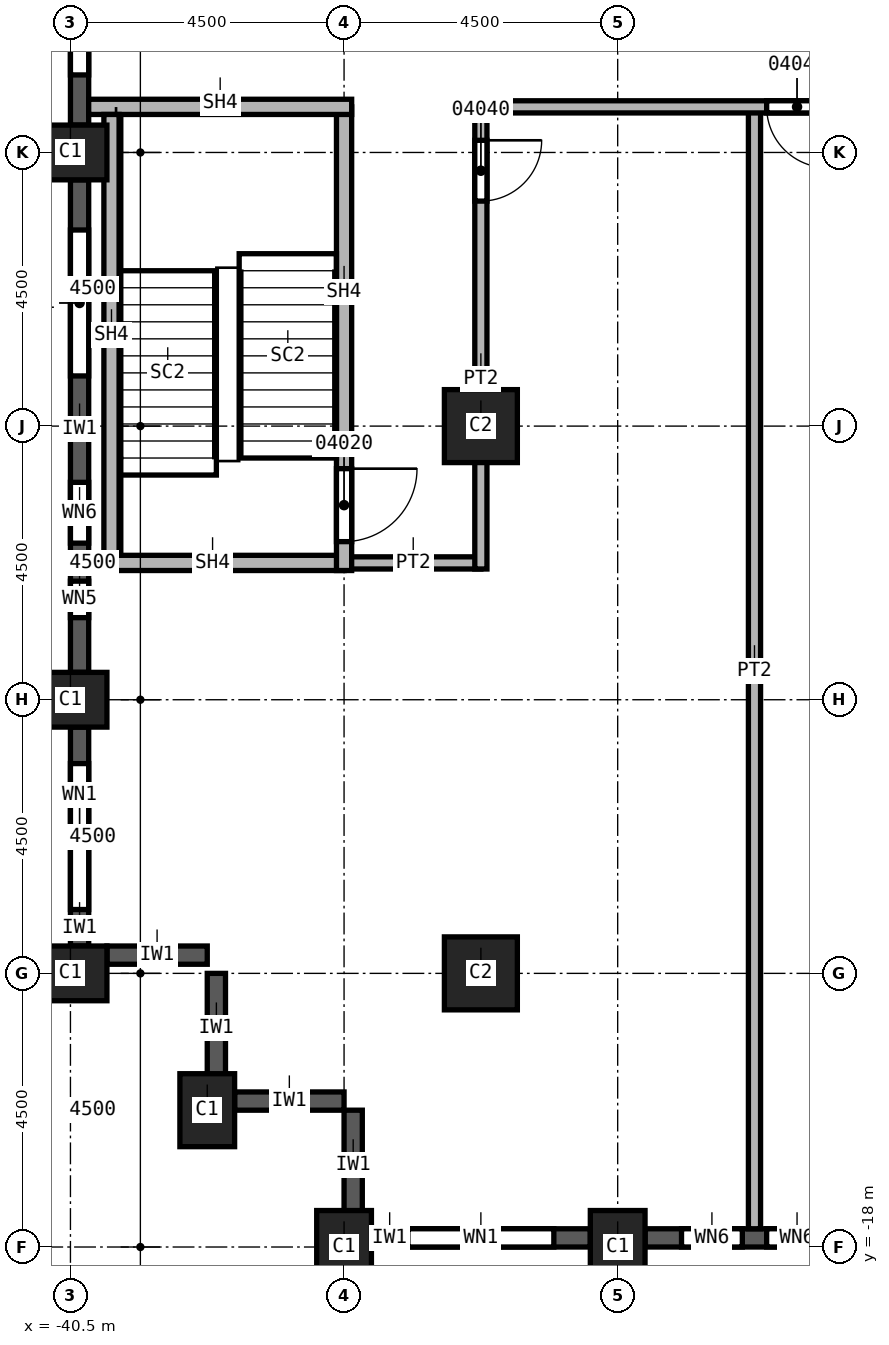
"""IFC4 building model, lengths in metres.
Left out: names, types, materials, properties, quantities, classifications, styles, units other than length and angle.
Written with IfcOpenShell. Run it as: python <this file> out.ifc"""

import sys

from ifc_helpers import new_model, si_unit, direction, frame, frame_2d, origin, origin_2d, place, context, subcontext, project, spatial, rectangle, extrude, element, fill, save


model = new_model("IFC4")
c1 = context("Model", 3, precision=1e-05, world=origin(), true_north=direction((0.0, 1.0)))
c2 = subcontext(c1, "Body", "Model", "MODEL_VIEW")
j1 = project(units=[si_unit("LENGTHUNIT", "METRE"), si_unit("PLANEANGLEUNIT", "RADIAN")], contexts=[c1])
p1 = place(None, origin())
s1 = spatial("IfcSite", under=j1, at=p1, CompositionType="ELEMENT")
p2 = place(p1, origin())
s2 = spatial("IfcBuilding", under=s1, at=p2, CompositionType="ELEMENT")
p3 = place(p2, frame((0.0, 0.0, 108.0)))
s3 = spatial("IfcBuildingStorey", under=s2, at=p3, CompositionType="ELEMENT", Elevation=108.0)
for number, where, z_axis, x_axis in (
    (1, (-40.5, 0.0, 0.0), (0.0, 0.0, 1.0), (0.0, 1.0, 0.0)),
    (2, (-40.5, -9.0, 0.0), (0.0, 0.0, 1.0), (0.0, 1.0, 0.0)),
    (3, (-40.5, -13.5, 0.0), (0.0, 0.0, 1.0), (0.0, 1.0, 0.0)),
    (4, (-38.25, -15.75, 0.0), (0.0, 0.0, 1.0), (1.0, 0.0, 0.0)),
    (5, (-31.5, -18.0, 0.0), (0.0, 0.0, 1.0), (1.0, 0.0, 0.0)),
    (6, (-36.0, -18.0, 0.0), (0.0, 0.0, 1.0), (1.0, 0.0, 0.0)),
):
    element("IfcColumn", number, at=place(p3, frame(where, z_axis=z_axis, x_axis=x_axis)), inside=s3, PredefinedType="COLUMN", context=c2, shape_type="SweptSolid", body=[
        extrude(rectangle(XDim=0.9, YDim=1.2, at=origin_2d()), origin(), (0.0, 0.0, 1.0), 3.7),
    ])
for number, where, z_axis, x_axis in (
    (7, (-33.75, -4.5, 0.0), (0.0, 0.0, 1.0), (1.0, 0.0, 0.0)),
    (8, (-33.75, -13.5, 0.0), (0.0, 0.0, 1.0), (1.0, 0.0, 0.0)),
):
    element("IfcColumn", number, at=place(p3, frame(where, z_axis=z_axis, x_axis=x_axis)), inside=s3, PredefinedType="COLUMN", context=c2, shape_type="SweptSolid", body=[
        extrude(rectangle(XDim=1.2, YDim=1.2, at=origin_2d()), origin(), (0.0, 0.0, 1.0), 3.7),
    ])
p4 = place(p3, frame((-39.9, -13.2, 0.0), z_axis=(0.0, 0.0, 1.0), x_axis=(1.0, 0.0, 0.0)))
e9 = element("IfcWall", 9, at=p4, inside=s3, PredefinedType="SOLIDWALL", context=c2, shape_type="SweptSolid", body=[
    extrude(rectangle(XDim=1.65, YDim=0.3, at=frame_2d((0.825, 0.0))), origin(), (0.0, 0.0, 1.0), 3.1),
])
for number, where, z_axis, x_axis in (
    (10, (-38.1, -15.3, 0.0), (0.0, 0.0, 1.0), (0.0, 1.0, 0.0)),
    (11, (-37.8, -15.6, 0.0), (0.0, 0.0, 1.0), (1.0, 0.0, 0.0)),
    (12, (-35.85, -17.55, 0.0), (0.0, 0.0, 1.0), (0.0, 1.0, 0.0)),
):
    element("IfcWall", number, at=place(p3, frame(where, z_axis=z_axis, x_axis=x_axis)), inside=s3, PredefinedType="SOLIDWALL", context=c2, shape_type="SweptSolid", body=[
        extrude(rectangle(XDim=1.8, YDim=0.3, at=frame_2d((0.9, 0.0))), origin(), (0.0, 0.0, 1.0), 3.1),
    ])
p5 = place(p3, frame((-40.35, 8.55, 0.0), z_axis=(0.0, 0.0, 1.0), x_axis=(0.0, -1.0, 0.0)))
e13 = element("IfcWall", 13, at=p5, inside=s3, PredefinedType="SOLIDWALL", context=c2, shape_type="SweptSolid", body=[
    extrude(rectangle(XDim=8.1, YDim=0.3, at=frame_2d((4.05, 0.0))), origin(), (0.0, 0.0, 1.0), 3.1),
])
p6 = place(p5, frame((0.825, 0.0, 0.8)))
e14 = element("IfcOpeningElement", 14, at=p6, cuts=e13, PredefinedType="OPENING", context=c2, shape_type="SweptSolid", body=[
    extrude(rectangle(XDim=2.4, YDim=1.95, at=frame_2d((1.2, 0.975))), frame((0.0, 0.15, 0.0), z_axis=(0.0, -1.0, 0.0), x_axis=(1.0, 0.0, 0.0)), (0.0, 0.0, 1.0), 0.3),
])
p7 = place(p5, frame((4.875, 0.0, 0.8)))
e15 = element("IfcOpeningElement", 15, at=p7, cuts=e13, PredefinedType="OPENING", context=c2, shape_type="SweptSolid", body=[
    extrude(rectangle(XDim=2.4, YDim=1.95, at=frame_2d((1.2, 0.975))), frame((0.0, 0.15, 0.0), z_axis=(0.0, -1.0, 0.0), x_axis=(1.0, 0.0, 0.0)), (0.0, 0.0, 1.0), 0.3),
])
p8 = place(p3, frame((-40.35, -0.45, 0.0), z_axis=(0.0, 0.0, 1.0), x_axis=(0.0, -1.0, 0.0)))
e16 = element("IfcWall", 16, at=p8, inside=s3, PredefinedType="SOLIDWALL", context=c2, shape_type="SweptSolid", body=[
    extrude(rectangle(XDim=8.1, YDim=0.3, at=frame_2d((4.05, 0.0))), origin(), (0.0, 0.0, 1.0), 3.1),
])
p9 = place(p8, frame((0.825, 0.0, 0.8)))
e17 = element("IfcOpeningElement", 17, at=p9, cuts=e16, PredefinedType="OPENING", context=c2, shape_type="SweptSolid", body=[
    extrude(rectangle(XDim=2.4, YDim=1.95, at=frame_2d((1.2, 0.975))), frame((0.0, 0.15, 0.0), z_axis=(0.0, -1.0, 0.0), x_axis=(1.0, 0.0, 0.0)), (0.0, 0.0, 1.0), 0.3),
])
p10 = place(p8, frame((4.975, 0.0, 0.8)))
e18 = element("IfcOpeningElement", 18, at=p10, cuts=e16, PredefinedType="OPENING", context=c2, shape_type="SweptSolid", body=[
    extrude(rectangle(XDim=1.0, YDim=1.95, at=frame_2d((0.5, 0.975))), frame((0.0, 0.15, 0.0), z_axis=(0.0, -1.0, 0.0), x_axis=(1.0, 0.0, 0.0)), (0.0, 0.0, 1.0), 0.3),
])
p11 = place(p8, frame((6.6, 0.0, 0.8)))
e19 = element("IfcOpeningElement", 19, at=p11, cuts=e16, PredefinedType="OPENING", context=c2, shape_type="SweptSolid", body=[
    extrude(rectangle(XDim=0.6, YDim=1.95, at=frame_2d((0.3, 0.975))), frame((0.0, 0.15, 0.0), z_axis=(0.0, -1.0, 0.0), x_axis=(1.0, 0.0, 0.0)), (0.0, 0.0, 1.0), 0.3),
])
p12 = place(p3, frame((-40.35, -9.45, 0.0), z_axis=(0.0, 0.0, 1.0), x_axis=(0.0, -1.0, 0.0)))
e20 = element("IfcWall", 20, at=p12, inside=s3, PredefinedType="SOLIDWALL", context=c2, shape_type="SweptSolid", body=[
    extrude(rectangle(XDim=3.6, YDim=0.3, at=frame_2d((1.8, 0.0))), origin(), (0.0, 0.0, 1.0), 3.1),
])
p13 = place(p12, frame((0.6, 0.0, 0.8)))
e21 = element("IfcOpeningElement", 21, at=p13, cuts=e20, PredefinedType="OPENING", context=c2, shape_type="SweptSolid", body=[
    extrude(rectangle(XDim=2.4, YDim=1.95, at=frame_2d((1.2, 0.975))), frame((0.0, 0.15, 0.0), z_axis=(0.0, -1.0, 0.0), x_axis=(1.0, 0.0, 0.0)), (0.0, 0.0, 1.0), 0.3),
])
p14 = place(p3, frame((-35.55, -17.85, 0.0), z_axis=(0.0, 0.0, 1.0), x_axis=(1.0, 0.0, 0.0)))
e22 = element("IfcWall", 22, at=p14, inside=s3, PredefinedType="SOLIDWALL", context=c2, shape_type="SweptSolid", body=[
    extrude(rectangle(XDim=3.6, YDim=0.3, at=frame_2d((1.8, 0.0))), origin(), (0.0, 0.0, 1.0), 3.1),
])
p15 = place(p14, frame((0.6, 0.0, 0.8)))
e23 = element("IfcOpeningElement", 23, at=p15, cuts=e22, PredefinedType="OPENING", context=c2, shape_type="SweptSolid", body=[
    extrude(rectangle(XDim=2.4, YDim=1.95, at=frame_2d((1.2, 0.975))), frame((0.0, 0.15, 0.0), z_axis=(0.0, -1.0, 0.0), x_axis=(1.0, 0.0, 0.0)), (0.0, 0.0, 1.0), 0.3),
])
p16 = place(p3, frame((-31.05, -17.85, 0.0), z_axis=(0.0, 0.0, 1.0), x_axis=(1.0, 0.0, 0.0)))
e24 = element("IfcWall", 24, at=p16, inside=s3, PredefinedType="SOLIDWALL", context=c2, shape_type="SweptSolid", body=[
    extrude(rectangle(XDim=3.6, YDim=0.3, at=frame_2d((1.8, 0.0))), origin(), (0.0, 0.0, 1.0), 3.1),
])
p17 = place(p16, frame((0.6, 0.0, 0.8)))
e25 = element("IfcOpeningElement", 25, at=p17, cuts=e24, PredefinedType="OPENING", context=c2, shape_type="SweptSolid", body=[
    extrude(rectangle(XDim=1.0, YDim=1.95, at=frame_2d((0.5, 0.975))), frame((0.0, 0.15, 0.0), z_axis=(0.0, -1.0, 0.0), x_axis=(1.0, 0.0, 0.0)), (0.0, 0.0, 1.0), 0.3),
])
p18 = place(p16, frame((2.0, 0.0, 0.8)))
e26 = element("IfcOpeningElement", 26, at=p18, cuts=e24, PredefinedType="OPENING", context=c2, shape_type="SweptSolid", body=[
    extrude(rectangle(XDim=1.0, YDim=1.95, at=frame_2d((0.5, 0.975))), frame((0.0, 0.15, 0.0), z_axis=(0.0, -1.0, 0.0), x_axis=(1.0, 0.0, 0.0)), (0.0, 0.0, 1.0), 0.3),
])
p19 = place(p3, frame((-33.75, -6.75, 0.0), z_axis=(0.0, 0.0, 1.0), x_axis=(-1.0, 0.0, 0.0)))
e27 = element("IfcWall", 27, at=p19, inside=s3, PredefinedType="PARTITIONING", context=c2, shape_type="SweptSolid", body=[
    extrude(rectangle(XDim=2.25, YDim=0.2, at=frame_2d((1.125, 0.0))), origin(), (0.0, 0.0, 1.0), 3.7),
])
p20 = place(p3, frame((-33.75, 0.75, 0.0), z_axis=(0.0, 0.0, 1.0), x_axis=(0.0, -1.0, 0.0)))
e28 = element("IfcWall", 28, at=p20, inside=s3, PredefinedType="PARTITIONING", context=c2, shape_type="SweptSolid", body=[
    extrude(rectangle(XDim=7.6, YDim=0.2, at=frame_2d((3.8, 0.0))), origin(), (0.0, 0.0, 1.0), 3.7),
])
p21 = place(p20, frame((0.55, 0.0, 0.0)))
e29 = element("IfcOpeningElement", 29, at=p21, cuts=e28, PredefinedType="OPENING", context=c2, shape_type="SweptSolid", body=[
    extrude(rectangle(XDim=1.0, YDim=2.1, at=frame_2d((0.5, 1.05))), frame((0.0, 0.1, 0.0), z_axis=(0.0, -1.0, 0.0), x_axis=(1.0, 0.0, 0.0)), (0.0, 0.0, 1.0), 0.2),
])
p22 = place(p3, frame((-29.25, 0.75, 0.0), z_axis=(0.0, 0.0, 1.0), x_axis=(0.0, -1.0, 0.0)))
e30 = element("IfcWall", 30, at=p22, inside=s3, PredefinedType="PARTITIONING", context=c2, shape_type="SweptSolid", body=[
    extrude(rectangle(XDim=18.45, YDim=0.2, at=frame_2d((9.225, 0.0))), origin(), (0.0, 0.0, 1.0), 3.7),
])
p23 = place(p3, frame((-15.4, 0.75, 0.0), z_axis=(0.0, 0.0, 1.0), x_axis=(-1.0, 0.0, 0.0)))
e31 = element("IfcWall", 31, at=p23, inside=s3, PredefinedType="PARTITIONING", context=c2, shape_type="SweptSolid", body=[
    extrude(rectangle(XDim=18.45, YDim=0.2, at=frame_2d((9.225, 0.0))), origin(), (0.0, 0.0, 1.0), 3.7),
])
p24 = place(p23, frame((12.65, 0.0, 0.0)))
e32 = element("IfcOpeningElement", 32, at=p24, cuts=e31, PredefinedType="OPENING", context=c2, shape_type="SweptSolid", body=[
    extrude(rectangle(XDim=1.0, YDim=2.1, at=frame_2d((0.5, 1.05))), frame((0.0, 0.1, 0.0), z_axis=(0.0, -1.0, 0.0), x_axis=(1.0, 0.0, 0.0)), (0.0, 0.0, 1.0), 0.2),
])
p25 = place(p3, frame((-36.0, -6.75, 0.0), z_axis=(0.0, 0.0, 1.0), x_axis=(-1.0, 0.0, 0.0)))
e33 = element("IfcWall", 33, at=p25, inside=s3, PredefinedType="SOLIDWALL", context=c2, shape_type="SweptSolid", body=[
    extrude(rectangle(XDim=4.2, YDim=0.25, at=frame_2d((2.1, 0.0))), origin(), (0.0, 0.0, 1.0), 3.7),
])
p26 = place(p3, frame((-36.0, 0.75, 0.0), z_axis=(0.0, 0.0, 1.0), x_axis=(0.0, -1.0, 0.0)))
e34 = element("IfcWall", 34, at=p26, inside=s3, PredefinedType="SOLIDWALL", context=c2, shape_type="SweptSolid", body=[
    extrude(rectangle(XDim=7.625, YDim=0.25, at=frame_2d((3.812, 0.0))), origin(), (0.0, 0.0, 1.0), 3.7),
])
p27 = place(p26, frame((5.95, 0.0, 0.0)))
e35 = element("IfcOpeningElement", 35, at=p27, cuts=e34, PredefinedType="OPENING", context=c2, shape_type="SweptSolid", body=[
    extrude(rectangle(XDim=1.2, YDim=2.1, at=frame_2d((0.6, 1.05))), frame((0.0, 0.125, 0.0), z_axis=(0.0, -1.0, 0.0), x_axis=(1.0, 0.0, 0.0)), (0.0, 0.0, 1.0), 0.25),
])
p28 = place(p3, frame((-35.875, 0.75, 0.0), z_axis=(0.0, 0.0, 1.0), x_axis=(-1.0, 0.0, 0.0)))
e36 = element("IfcWall", 36, at=p28, inside=s3, PredefinedType="SOLIDWALL", context=c2, shape_type="SweptSolid", body=[
    extrude(rectangle(XDim=4.325, YDim=0.25, at=frame_2d((2.163, 0.0))), origin(), (0.0, 0.0, 1.0), 3.7),
])
p29 = place(p3, frame((-39.825, -6.625, 0.0), z_axis=(0.0, 0.0, 1.0), x_axis=(0.0, 1.0, 0.0)))
e37 = element("IfcWall", 37, at=p29, inside=s3, PredefinedType="SOLIDWALL", context=c2, shape_type="SweptSolid", body=[
    extrude(rectangle(XDim=7.25, YDim=0.25, at=frame_2d((3.625, 0.0))), origin(), (0.0, 0.0, 1.0), 3.7),
])
p30 = place(p7, origin())
e38 = element("IfcWindow", 38, at=p30, inside=s3, PartitioningType="SINGLE_PANEL", PredefinedType="WINDOW", context=c2, shape_type="SweptSolid", body=[
    extrude(rectangle(XDim=2.4, YDim=1.95, at=frame_2d((1.2, 0.975))), frame((0.0, 0.03, 0.0), z_axis=(0.0, -1.0, 0.0), x_axis=(1.0, 0.0, 0.0)), (0.0, 0.0, 1.0), 0.06),
])
fill(e15, e38)
p31 = place(p9, origin())
e39 = element("IfcWindow", 39, at=p31, inside=s3, PartitioningType="SINGLE_PANEL", PredefinedType="WINDOW", context=c2, shape_type="SweptSolid", body=[
    extrude(rectangle(XDim=2.4, YDim=1.95, at=frame_2d((1.2, 0.975))), frame((0.0, 0.03, 0.0), z_axis=(0.0, -1.0, 0.0), x_axis=(1.0, 0.0, 0.0)), (0.0, 0.0, 1.0), 0.06),
])
fill(e17, e39)
p32 = place(p13, origin())
e40 = element("IfcWindow", 40, at=p32, inside=s3, PartitioningType="SINGLE_PANEL", PredefinedType="WINDOW", context=c2, shape_type="SweptSolid", body=[
    extrude(rectangle(XDim=2.4, YDim=1.95, at=frame_2d((1.2, 0.975))), frame((0.0, 0.03, 0.0), z_axis=(0.0, -1.0, 0.0), x_axis=(1.0, 0.0, 0.0)), (0.0, 0.0, 1.0), 0.06),
])
fill(e21, e40)
p33 = place(p15, origin())
e41 = element("IfcWindow", 41, at=p33, inside=s3, PartitioningType="SINGLE_PANEL", PredefinedType="WINDOW", context=c2, shape_type="SweptSolid", body=[
    extrude(rectangle(XDim=2.4, YDim=1.95, at=frame_2d((1.2, 0.975))), frame((0.0, 0.03, 0.0), z_axis=(0.0, -1.0, 0.0), x_axis=(1.0, 0.0, 0.0)), (0.0, 0.0, 1.0), 0.06),
])
fill(e23, e41)
p34 = place(p27, origin())
e42 = element("IfcDoor", 42, at=p34, inside=s3, OperationType="SINGLE_SWING_LEFT", PredefinedType="DOOR", context=c2, shape_type="SweptSolid", body=[
    extrude(rectangle(XDim=1.2, YDim=2.1, at=frame_2d((0.6, 1.05))), frame((0.0, 0.025, 0.0), z_axis=(0.0, -1.0, 0.0), x_axis=(1.0, 0.0, 0.0)), (0.0, 0.0, 1.0), 0.05),
])
fill(e35, e42)
p35 = place(p21, origin())
e43 = element("IfcDoor", 43, at=p35, inside=s3, OperationType="SINGLE_SWING_LEFT", PredefinedType="DOOR", context=c2, shape_type="SweptSolid", body=[
    extrude(rectangle(XDim=1.0, YDim=2.1, at=frame_2d((0.5, 1.05))), frame((0.0, 0.025, 0.0), z_axis=(0.0, -1.0, 0.0), x_axis=(1.0, 0.0, 0.0)), (0.0, 0.0, 1.0), 0.05),
])
fill(e29, e43)
p36 = place(p24, origin())
e44 = element("IfcDoor", 44, at=p36, inside=s3, OperationType="SINGLE_SWING_RIGHT", PredefinedType="DOOR", context=c2, shape_type="SweptSolid", body=[
    extrude(rectangle(XDim=1.0, YDim=2.1, at=frame_2d((0.5, 1.05))), frame((0.0, 0.025, 0.0), z_axis=(0.0, -1.0, 0.0), x_axis=(1.0, 0.0, 0.0)), (0.0, 0.0, 1.0), 0.05),
])
fill(e32, e44)
p37 = place(p10, origin())
e45 = element("IfcWindow", 45, at=p37, inside=s3, PartitioningType="SINGLE_PANEL", PredefinedType="WINDOW", context=c2, shape_type="SweptSolid", body=[
    extrude(rectangle(XDim=1.0, YDim=1.95, at=frame_2d((0.5, 0.975))), frame((0.0, 0.03, 0.0), z_axis=(0.0, -1.0, 0.0), x_axis=(1.0, 0.0, 0.0)), (0.0, 0.0, 1.0), 0.06),
])
fill(e18, e45)
p38 = place(p11, origin())
e46 = element("IfcWindow", 46, at=p38, inside=s3, PartitioningType="SINGLE_PANEL", PredefinedType="WINDOW", context=c2, shape_type="SweptSolid", body=[
    extrude(rectangle(XDim=0.6, YDim=1.95, at=frame_2d((0.3, 0.975))), frame((0.0, 0.03, 0.0), z_axis=(0.0, -1.0, 0.0), x_axis=(1.0, 0.0, 0.0)), (0.0, 0.0, 1.0), 0.06),
])
fill(e19, e46)
p39 = place(p17, origin())
e47 = element("IfcWindow", 47, at=p39, inside=s3, PartitioningType="SINGLE_PANEL", PredefinedType="WINDOW", context=c2, shape_type="SweptSolid", body=[
    extrude(rectangle(XDim=1.0, YDim=1.95, at=frame_2d((0.5, 0.975))), frame((0.0, 0.03, 0.0), z_axis=(0.0, -1.0, 0.0), x_axis=(1.0, 0.0, 0.0)), (0.0, 0.0, 1.0), 0.06),
])
fill(e25, e47)
p40 = place(p18, origin())
e48 = element("IfcWindow", 48, at=p40, inside=s3, PartitioningType="SINGLE_PANEL", PredefinedType="WINDOW", context=c2, shape_type="SweptSolid", body=[
    extrude(rectangle(XDim=1.0, YDim=1.95, at=frame_2d((0.5, 0.975))), frame((0.0, 0.03, 0.0), z_axis=(0.0, -1.0, 0.0), x_axis=(1.0, 0.0, 0.0)), (0.0, 0.0, 1.0), 0.06),
])
fill(e26, e48)
save(model, sys.argv[1])
